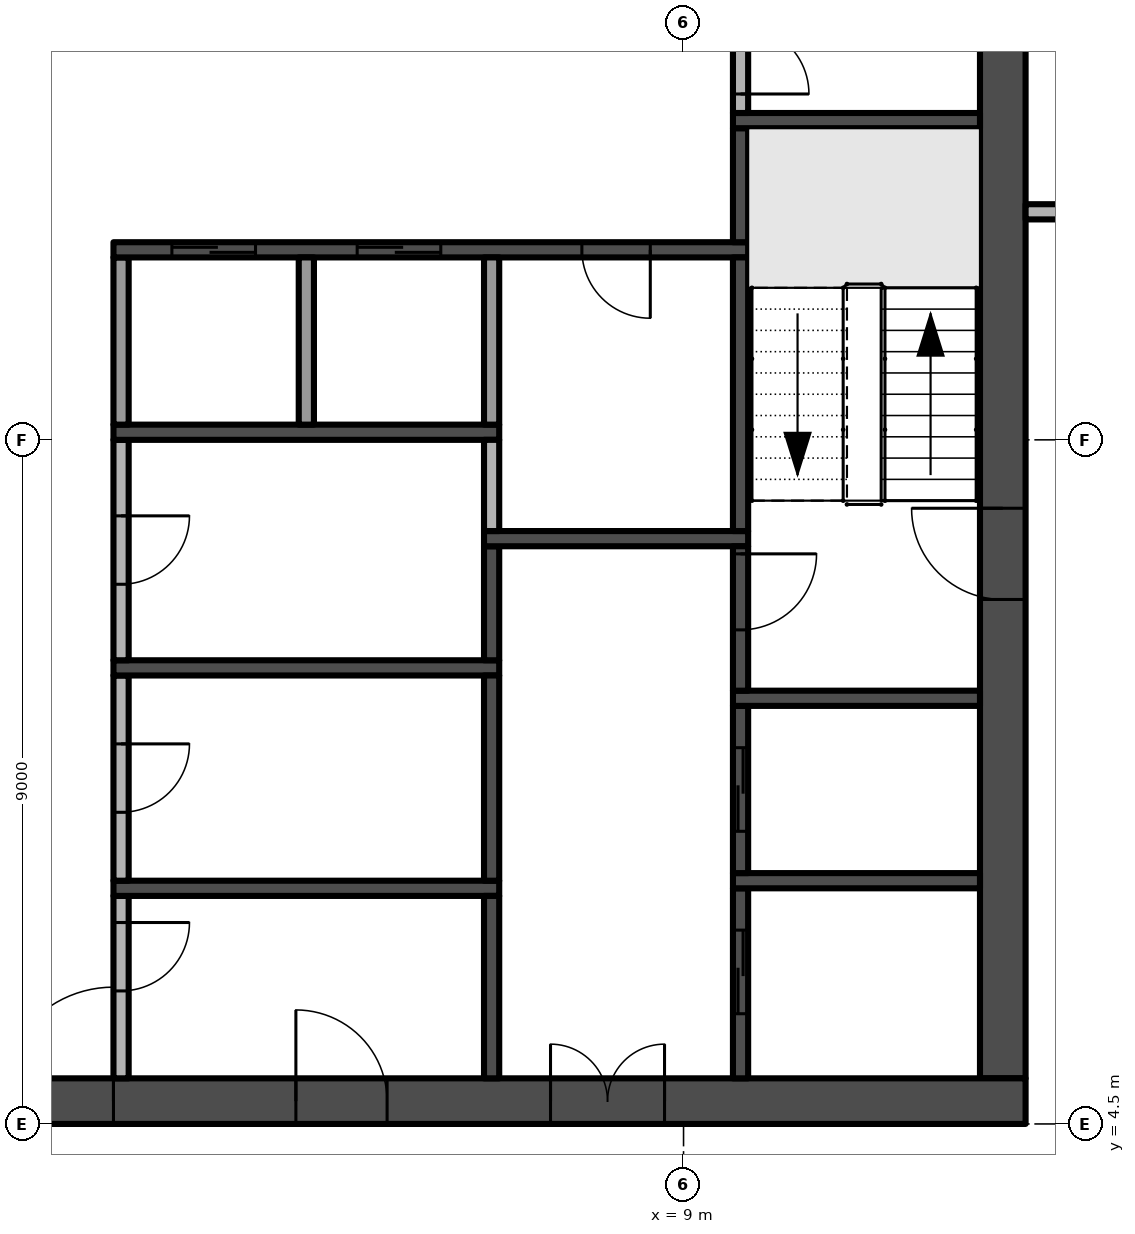
"""IFC4 building model, lengths in metres.
Left out: names, types, materials, properties, quantities, classifications, styles, units other than length and angle.
Written with IfcOpenShell. Run it as: python <this file> out.ifc"""

import sys

from ifc_helpers import new_model, si_unit, direction, frame, frame_2d, origin, place, context, subcontext, project, spatial, rectangle, extrude, element, fill, save


model = new_model("IFC4")
c1 = context("Model", 3, precision=1e-05, world=origin(), true_north=direction((0.0, 1.0)))
c2 = subcontext(c1, "Body", "Model", "MODEL_VIEW")
j1 = project(units=[si_unit("LENGTHUNIT", "METRE"), si_unit("PLANEANGLEUNIT", "RADIAN")], contexts=[c1])
p1 = place(None, origin())
s1 = spatial("IfcSite", under=j1, at=p1, CompositionType="ELEMENT")
p2 = place(p1, origin())
s2 = spatial("IfcBuilding", under=s1, at=p2, CompositionType="ELEMENT")
p3 = place(p2, frame((0.0, 0.0, 280.6)))
s3 = spatial("IfcBuildingStorey", under=s2, at=p3, CompositionType="ELEMENT", Elevation=280.6)
p4 = place(p3, frame((-13.5, 4.8, -0.3), z_axis=(0.0, 0.0, 1.0), x_axis=(1.0, 0.0, 0.0)))
e1 = element("IfcWall", 1, at=p4, inside=s3, PredefinedType="SHEAR", context=c2, shape_type="SweptSolid", body=[
    extrude(rectangle(XDim=27.0, YDim=0.6, at=frame_2d((13.5, 0.0))), origin(), (0.0, 0.0, 1.0), 3.8),
])
p5 = place(p4, frame((12.0, 0.0, 0.3)))
e2 = element("IfcOpeningElement", 2, at=p5, cuts=e1, PredefinedType="OPENING", context=c2, shape_type="SweptSolid", body=[
    extrude(rectangle(XDim=3.0, YDim=2.4, at=frame_2d((1.5, 1.2))), frame((0.0, 0.31, 0.0), z_axis=(0.0, -1.0, 0.0), x_axis=(1.0, 0.0, 0.0)), (0.0, 0.0, 1.0), 0.62),
])
p6 = place(p4, frame((4.9, 0.0, 0.3)))
e3 = element("IfcOpeningElement", 3, at=p6, cuts=e1, PredefinedType="OPENING", context=c2, shape_type="SweptSolid", body=[
    extrude(rectangle(XDim=1.2, YDim=2.2, at=frame_2d((0.6, 1.1))), frame((0.0, 0.31, 0.0), z_axis=(0.0, -1.0, 0.0), x_axis=(1.0, 0.0, 0.0)), (0.0, 0.0, 1.0), 0.62),
])
p7 = place(p4, frame((20.75, 0.0, 0.3)))
e4 = element("IfcOpeningElement", 4, at=p7, cuts=e1, PredefinedType="OPENING", context=c2, shape_type="SweptSolid", body=[
    extrude(rectangle(XDim=1.5, YDim=2.2, at=frame_2d((0.75, 1.1))), frame((0.0, 0.31, 0.0), z_axis=(0.0, -1.0, 0.0), x_axis=(1.0, 0.0, 0.0)), (0.0, 0.0, 1.0), 0.62),
])
p8 = place(p4, frame((17.4, 0.0, 0.3)))
e5 = element("IfcOpeningElement", 5, at=p8, cuts=e1, PredefinedType="OPENING", context=c2, shape_type="SweptSolid", body=[
    extrude(rectangle(XDim=1.2, YDim=2.2, at=frame_2d((0.6, 1.1))), frame((0.0, 0.31, 0.0), z_axis=(0.0, -1.0, 0.0), x_axis=(1.0, 0.0, 0.0)), (0.0, 0.0, 1.0), 0.62),
])
p9 = place(p3, frame((13.2, 5.1, -0.3), z_axis=(0.0, 0.0, 1.0), x_axis=(0.0, 1.0, 0.0)))
e6 = element("IfcWall", 6, at=p9, inside=s3, PredefinedType="SHEAR", context=c2, shape_type="SweptSolid", body=[
    extrude(rectangle(XDim=16.8, YDim=0.6, at=frame_2d((8.4, 0.0))), origin(), (0.0, 0.0, 1.0), 3.8),
])
p10 = place(p9, frame((6.3, 0.0, 0.3)))
e7 = element("IfcOpeningElement", 7, at=p10, cuts=e6, PredefinedType="OPENING", context=c2, shape_type="SweptSolid", body=[
    extrude(rectangle(XDim=1.2, YDim=2.2, at=frame_2d((0.6, 1.1))), frame((0.0, 0.31, 0.0), z_axis=(0.0, -1.0, 0.0), x_axis=(1.0, 0.0, 0.0)), (0.0, 0.0, 1.0), 0.62),
])
p11 = place(p3, frame((1.6, 7.5, 0.0), z_axis=(0.0, 0.0, 1.0), x_axis=(0.0, -1.0, 0.0)))
e8 = element("IfcWall", 8, at=p11, inside=s3, PredefinedType="PARTITIONING", context=c2, shape_type="SweptSolid", body=[
    extrude(rectangle(XDim=2.4, YDim=0.2, at=frame_2d((1.2, 0.0))), origin(), (0.0, 0.0, 1.0), 3.5),
])
p12 = place(p11, frame((0.35, 0.0, 0.0)))
e9 = element("IfcOpeningElement", 9, at=p12, cuts=e8, PredefinedType="OPENING", context=c2, shape_type="SweptSolid", body=[
    extrude(rectangle(XDim=0.9, YDim=2.1, at=frame_2d((0.45, 1.05))), frame((0.0, 0.11, 0.0), z_axis=(0.0, -1.0, 0.0), x_axis=(1.0, 0.0, 0.0)), (0.0, 0.0, 1.0), 0.22),
])
p13 = place(p3, frame((1.5, 7.6, 0.0), z_axis=(0.0, 0.0, 1.0), x_axis=(1.0, 0.0, 0.0)))
e10 = element("IfcWall", 10, at=p13, inside=s3, PredefinedType="SHEAR", context=c2, shape_type="SweptSolid", body=[
    extrude(rectangle(XDim=5.075, YDim=0.2, at=frame_2d((2.538, 0.0))), origin(), (0.0, 0.0, 1.0), 3.5),
])
p14 = place(p3, frame((1.6, 10.4, 0.0), z_axis=(0.0, 0.0, 1.0), x_axis=(0.0, -1.0, 0.0)))
e11 = element("IfcWall", 11, at=p14, inside=s3, PredefinedType="PARTITIONING", context=c2, shape_type="SweptSolid", body=[
    extrude(rectangle(XDim=2.7, YDim=0.2, at=frame_2d((1.35, 0.0))), origin(), (0.0, 0.0, 1.0), 3.5),
])
p15 = place(p14, frame((0.9, 0.0, 0.0)))
e12 = element("IfcOpeningElement", 12, at=p15, cuts=e11, PredefinedType="OPENING", context=c2, shape_type="SweptSolid", body=[
    extrude(rectangle(XDim=0.9, YDim=2.1, at=frame_2d((0.45, 1.05))), frame((0.0, 0.11, 0.0), z_axis=(0.0, -1.0, 0.0), x_axis=(1.0, 0.0, 0.0)), (0.0, 0.0, 1.0), 0.22),
])
p16 = place(p3, frame((1.5, 10.5, 0.0), z_axis=(0.0, 0.0, 1.0), x_axis=(1.0, 0.0, 0.0)))
e13 = element("IfcWall", 13, at=p16, inside=s3, PredefinedType="SHEAR", context=c2, shape_type="SweptSolid", body=[
    extrude(rectangle(XDim=5.075, YDim=0.2, at=frame_2d((2.538, 0.0))), origin(), (0.0, 0.0, 1.0), 3.5),
])
p17 = place(p3, frame((1.6, 13.5, 0.0), z_axis=(0.0, 0.0, 1.0), x_axis=(0.0, -1.0, 0.0)))
e14 = element("IfcWall", 14, at=p17, inside=s3, PredefinedType="PARTITIONING", context=c2, shape_type="SweptSolid", body=[
    extrude(rectangle(XDim=2.9, YDim=0.2, at=frame_2d((1.45, 0.0))), origin(), (0.0, 0.0, 1.0), 3.5),
])
p18 = place(p17, frame((1.0, 0.0, 0.0)))
e15 = element("IfcOpeningElement", 15, at=p18, cuts=e14, PredefinedType="OPENING", context=c2, shape_type="SweptSolid", body=[
    extrude(rectangle(XDim=0.9, YDim=2.1, at=frame_2d((0.45, 1.05))), frame((0.0, 0.11, 0.0), z_axis=(0.0, -1.0, 0.0), x_axis=(1.0, 0.0, 0.0)), (0.0, 0.0, 1.0), 0.22),
])
p19 = place(p3, frame((1.5, 13.6, 0.0), z_axis=(0.0, 0.0, 1.0), x_axis=(1.0, 0.0, 0.0)))
e16 = element("IfcWall", 16, at=p19, inside=s3, PredefinedType="SHEAR", context=c2, shape_type="SweptSolid", body=[
    extrude(rectangle(XDim=5.075, YDim=0.2, at=frame_2d((2.538, 0.0))), origin(), (0.0, 0.0, 1.0), 3.5),
])
p20 = place(p3, frame((1.6, 13.7, 0.0), z_axis=(0.0, 0.0, 1.0), x_axis=(0.0, 1.0, 0.0)))
e17 = element("IfcWall", 17, at=p20, inside=s3, PredefinedType="PARTITIONING", context=c2, shape_type="SweptSolid", body=[
    extrude(rectangle(XDim=2.2, YDim=0.2, at=frame_2d((1.1, 0.0))), origin(), (0.0, 0.0, 1.0), 3.5),
])
p21 = place(p3, frame((9.85, 16.0, 0.0), z_axis=(0.0, 0.0, 1.0), x_axis=(-1.0, 0.0, 0.0)))
e18 = element("IfcWall", 18, at=p21, inside=s3, PredefinedType="SHEAR", context=c2, shape_type="SweptSolid", body=[
    extrude(rectangle(XDim=8.35, YDim=0.2, at=frame_2d((4.175, 0.0))), origin(), (0.0, 0.0, 1.0), 3.5),
])
p22 = place(p21, frame((6.481, 0.0, 0.0)))
e19 = element("IfcOpeningElement", 19, at=p22, cuts=e18, PredefinedType="OPENING", context=c2, shape_type="SweptSolid", body=[
    extrude(rectangle(XDim=1.1, YDim=2.1, at=frame_2d((0.55, 1.05))), frame((0.0, 0.11, 0.0), z_axis=(0.0, -1.0, 0.0), x_axis=(1.0, 0.0, 0.0)), (0.0, 0.0, 1.0), 0.22),
])
p23 = place(p21, frame((4.044, 0.0, 0.0)))
e20 = element("IfcOpeningElement", 20, at=p23, cuts=e18, PredefinedType="OPENING", context=c2, shape_type="SweptSolid", body=[
    extrude(rectangle(XDim=1.1, YDim=2.1, at=frame_2d((0.55, 1.05))), frame((0.0, 0.11, 0.0), z_axis=(0.0, -1.0, 0.0), x_axis=(1.0, 0.0, 0.0)), (0.0, 0.0, 1.0), 0.22),
])
p24 = place(p21, frame((1.288, 0.0, 0.0)))
e21 = element("IfcOpeningElement", 21, at=p24, cuts=e18, PredefinedType="OPENING", context=c2, shape_type="SweptSolid", body=[
    extrude(rectangle(XDim=0.9, YDim=2.1, at=frame_2d((0.45, 1.05))), frame((0.0, 0.11, 0.0), z_axis=(0.0, -1.0, 0.0), x_axis=(1.0, 0.0, 0.0)), (0.0, 0.0, 1.0), 0.22),
])
p25 = place(p3, frame((4.037, 13.7, 0.0), z_axis=(0.0, 0.0, 1.0), x_axis=(0.0, 1.0, 0.0)))
e22 = element("IfcWall", 22, at=p25, inside=s3, PredefinedType="PARTITIONING", context=c2, shape_type="SweptSolid", body=[
    extrude(rectangle(XDim=2.2, YDim=0.2, at=frame_2d((1.1, 0.0))), origin(), (0.0, 0.0, 1.0), 3.5),
])
p26 = place(p3, frame((6.475, 5.1, 0.0), z_axis=(0.0, 0.0, 1.0), x_axis=(0.0, 1.0, 0.0)))
e23 = element("IfcWall", 23, at=p26, inside=s3, PredefinedType="SHEAR", context=c2, shape_type="SweptSolid", body=[
    extrude(rectangle(XDim=2.4, YDim=0.2, at=frame_2d((1.2, 0.0))), origin(), (0.0, 0.0, 1.0), 3.5),
])
p27 = place(p3, frame((6.475, 7.7, 0.0), z_axis=(0.0, 0.0, 1.0), x_axis=(0.0, 1.0, 0.0)))
e24 = element("IfcWall", 24, at=p27, inside=s3, PredefinedType="SHEAR", context=c2, shape_type="SweptSolid", body=[
    extrude(rectangle(XDim=2.7, YDim=0.2, at=frame_2d((1.35, 0.0))), origin(), (0.0, 0.0, 1.0), 3.5),
])
p28 = place(p3, frame((6.475, 10.6, 0.0), z_axis=(0.0, 0.0, 1.0), x_axis=(0.0, 1.0, 0.0)))
e25 = element("IfcWall", 25, at=p28, inside=s3, PredefinedType="SHEAR", context=c2, shape_type="SweptSolid", body=[
    extrude(rectangle(XDim=1.5, YDim=0.2, at=frame_2d((0.75, 0.0))), origin(), (0.0, 0.0, 1.0), 3.5),
])
p29 = place(p3, frame((6.375, 12.2, 0.0), z_axis=(0.0, 0.0, 1.0), x_axis=(1.0, 0.0, 0.0)))
e26 = element("IfcWall", 26, at=p29, inside=s3, PredefinedType="SHEAR", context=c2, shape_type="SweptSolid", body=[
    extrude(rectangle(XDim=3.475, YDim=0.2, at=frame_2d((1.738, 0.0))), origin(), (0.0, 0.0, 1.0), 3.5),
])
p30 = place(p3, frame((6.475, 12.3, 0.0), z_axis=(0.0, 0.0, 1.0), x_axis=(0.0, 1.0, 0.0)))
e27 = element("IfcWall", 27, at=p30, inside=s3, PredefinedType="PARTITIONING", context=c2, shape_type="SweptSolid", body=[
    extrude(rectangle(XDim=1.2, YDim=0.2, at=frame_2d((0.6, 0.0))), origin(), (0.0, 0.0, 1.0), 3.5),
])
p31 = place(p3, frame((6.475, 13.7, 0.0), z_axis=(0.0, 0.0, 1.0), x_axis=(0.0, 1.0, 0.0)))
e28 = element("IfcWall", 28, at=p31, inside=s3, PredefinedType="PARTITIONING", context=c2, shape_type="SweptSolid", body=[
    extrude(rectangle(XDim=2.2, YDim=0.2, at=frame_2d((1.1, 0.0))), origin(), (0.0, 0.0, 1.0), 3.5),
])
p32 = place(p3, frame((9.75, 5.1, 0.0), z_axis=(0.0, 0.0, 1.0), x_axis=(0.0, 1.0, 0.0)))
e29 = element("IfcWall", 29, at=p32, inside=s3, PredefinedType="SHEAR", context=c2, shape_type="SweptSolid", body=[
    extrude(rectangle(XDim=2.5, YDim=0.2, at=frame_2d((1.25, 0.0))), origin(), (0.0, 0.0, 1.0), 3.5),
])
p33 = place(p32, frame((0.85, 0.0, 0.0)))
e30 = element("IfcOpeningElement", 30, at=p33, cuts=e29, PredefinedType="OPENING", context=c2, shape_type="SweptSolid", body=[
    extrude(rectangle(XDim=1.1, YDim=2.1, at=frame_2d((0.55, 1.05))), frame((0.0, 0.11, 0.0), z_axis=(0.0, -1.0, 0.0), x_axis=(1.0, 0.0, 0.0)), (0.0, 0.0, 1.0), 0.22),
])
p34 = place(p3, frame((9.65, 7.7, 0.0), z_axis=(0.0, 0.0, 1.0), x_axis=(1.0, 0.0, 0.0)))
e31 = element("IfcWall", 31, at=p34, inside=s3, PredefinedType="SHEAR", context=c2, shape_type="SweptSolid", body=[
    extrude(rectangle(XDim=3.25, YDim=0.2, at=frame_2d((1.625, 0.0))), origin(), (0.0, 0.0, 1.0), 3.5),
])
p35 = place(p3, frame((9.75, 7.8, 0.0), z_axis=(0.0, 0.0, 1.0), x_axis=(0.0, 1.0, 0.0)))
e32 = element("IfcWall", 32, at=p35, inside=s3, PredefinedType="SHEAR", context=c2, shape_type="SweptSolid", body=[
    extrude(rectangle(XDim=2.2, YDim=0.2, at=frame_2d((1.1, 0.0))), origin(), (0.0, 0.0, 1.0), 3.5),
])
p36 = place(p35, frame((0.55, 0.0, 0.0)))
e33 = element("IfcOpeningElement", 33, at=p36, cuts=e32, PredefinedType="OPENING", context=c2, shape_type="SweptSolid", body=[
    extrude(rectangle(XDim=1.1, YDim=2.1, at=frame_2d((0.55, 1.05))), frame((0.0, 0.11, 0.0), z_axis=(0.0, -1.0, 0.0), x_axis=(1.0, 0.0, 0.0)), (0.0, 0.0, 1.0), 0.22),
])
p37 = place(p3, frame((9.65, 10.1, 0.0), z_axis=(0.0, 0.0, 1.0), x_axis=(1.0, 0.0, 0.0)))
e34 = element("IfcWall", 34, at=p37, inside=s3, PredefinedType="SHEAR", context=c2, shape_type="SweptSolid", body=[
    extrude(rectangle(XDim=3.25, YDim=0.2, at=frame_2d((1.625, 0.0))), origin(), (0.0, 0.0, 1.0), 3.5),
])
p38 = place(p3, frame((9.75, 12.1, 0.0), z_axis=(0.0, 0.0, 1.0), x_axis=(0.0, -1.0, 0.0)))
e35 = element("IfcWall", 35, at=p38, inside=s3, PredefinedType="SHEAR", context=c2, shape_type="SweptSolid", body=[
    extrude(rectangle(XDim=1.9, YDim=0.2, at=frame_2d((0.95, 0.0))), origin(), (0.0, 0.0, 1.0), 3.5),
])
p39 = place(p38, frame((0.1, 0.0, 0.0)))
e36 = element("IfcOpeningElement", 36, at=p39, cuts=e35, PredefinedType="OPENING", context=c2, shape_type="SweptSolid", body=[
    extrude(rectangle(XDim=1.0, YDim=2.2, at=frame_2d((0.5, 1.1))), frame((0.0, 0.11, 0.0), z_axis=(0.0, -1.0, 0.0), x_axis=(1.0, 0.0, 0.0)), (0.0, 0.0, 1.0), 0.22),
])
p40 = place(p3, frame((9.75, 12.3, 0.0), z_axis=(0.0, 0.0, 1.0), x_axis=(0.0, 1.0, 0.0)))
e37 = element("IfcWall", 37, at=p40, inside=s3, PredefinedType="SHEAR", context=c2, shape_type="SweptSolid", body=[
    extrude(rectangle(XDim=3.6, YDim=0.2, at=frame_2d((1.8, 0.0))), origin(), (0.0, 0.0, 1.0), 3.5),
])
p41 = place(p3, frame((9.75, 16.1, 0.0), z_axis=(0.0, 0.0, 1.0), x_axis=(0.0, 1.0, 0.0)))
e38 = element("IfcWall", 38, at=p41, inside=s3, PredefinedType="SHEAR", context=c2, shape_type="SweptSolid", body=[
    extrude(rectangle(XDim=1.5, YDim=0.2, at=frame_2d((0.75, 0.0))), origin(), (0.0, 0.0, 1.0), 3.5),
])
p42 = place(p3, frame((9.65, 17.7, 0.0), z_axis=(0.0, 0.0, 1.0), x_axis=(1.0, 0.0, 0.0)))
e39 = element("IfcWall", 39, at=p42, inside=s3, PredefinedType="SHEAR", context=c2, shape_type="SweptSolid", body=[
    extrude(rectangle(XDim=3.25, YDim=0.2, at=frame_2d((1.625, 0.0))), origin(), (0.0, 0.0, 1.0), 3.5),
])
p43 = place(p3, frame((9.75, 19.2, 0.0), z_axis=(0.0, 0.0, 1.0), x_axis=(0.0, -1.0, 0.0)))
e40 = element("IfcWall", 40, at=p43, inside=s3, PredefinedType="PARTITIONING", context=c2, shape_type="SweptSolid", body=[
    extrude(rectangle(XDim=1.4, YDim=0.2, at=frame_2d((0.7, 0.0))), origin(), (0.0, 0.0, 1.0), 3.5),
])
p44 = place(p43, frame((0.25, 0.0, 0.0)))
e41 = element("IfcOpeningElement", 41, at=p44, cuts=e40, PredefinedType="OPENING", context=c2, shape_type="SweptSolid", body=[
    extrude(rectangle(XDim=0.9, YDim=2.1, at=frame_2d((0.45, 1.05))), frame((0.0, 0.11, 0.0), z_axis=(0.0, -1.0, 0.0), x_axis=(1.0, 0.0, 0.0)), (0.0, 0.0, 1.0), 0.22),
])
p45 = place(p3, frame((13.5, 16.5, 0.0), z_axis=(0.0, 0.0, 1.0), x_axis=(1.0, 0.0, 0.0)))
e42 = element("IfcWall", 42, at=p45, inside=s3, PredefinedType="PARTITIONING", context=c2, shape_type="SweptSolid", body=[
    extrude(rectangle(XDim=3.825, YDim=0.2, at=frame_2d((1.913, 0.0))), origin(), (0.0, 0.0, 1.0), 3.5),
])
p46 = place(p45, frame((1.55, 0.0, 0.0)))
e43 = element("IfcOpeningElement", 43, at=p46, cuts=e42, PredefinedType="OPENING", context=c2, shape_type="SweptSolid", body=[
    extrude(rectangle(XDim=0.9, YDim=2.1, at=frame_2d((0.45, 1.05))), frame((0.0, 0.11, 0.0), z_axis=(0.0, -1.0, 0.0), x_axis=(1.0, 0.0, 0.0)), (0.0, 0.0, 1.0), 0.22),
])
p47 = place(p5, frame((3.0, 0.0, 0.0), z_axis=(0.0, 0.0, 1.0), x_axis=(-1.0, 0.0, 0.0)))
e44 = element("IfcDoor", 44, at=p47, inside=s3, OperationType="DOUBLE_DOOR_SINGLE_SWING", PredefinedType="DOOR", context=c2, shape_type="SweptSolid", body=[
    extrude(rectangle(XDim=3.0, YDim=2.4, at=frame_2d((1.5, 1.2))), frame((0.0, 0.025, 0.0), z_axis=(0.0, -1.0, 0.0), x_axis=(1.0, 0.0, 0.0)), (0.0, 0.0, 1.0), 0.05),
])
fill(e2, e44)
p48 = place(p10, frame((1.2, 0.0, 0.0), z_axis=(0.0, 0.0, 1.0), x_axis=(-1.0, 0.0, 0.0)))
e45 = element("IfcDoor", 45, at=p48, inside=s3, OperationType="SINGLE_SWING_LEFT", PredefinedType="DOOR", context=c2, shape_type="SweptSolid", body=[
    extrude(rectangle(XDim=1.2, YDim=2.2, at=frame_2d((0.6, 1.1))), frame((0.0, 0.025, 0.0), z_axis=(0.0, -1.0, 0.0), x_axis=(1.0, 0.0, 0.0)), (0.0, 0.0, 1.0), 0.05),
])
fill(e7, e45)
p49 = place(p7, frame((1.5, 0.0, 0.0), z_axis=(0.0, 0.0, 1.0), x_axis=(-1.0, 0.0, 0.0)))
e46 = element("IfcDoor", 46, at=p49, inside=s3, OperationType="DOUBLE_DOOR_SINGLE_SWING", PredefinedType="DOOR", context=c2, shape_type="SweptSolid", body=[
    extrude(rectangle(XDim=1.5, YDim=2.2, at=frame_2d((0.75, 1.1))), frame((0.0, 0.025, 0.0), z_axis=(0.0, -1.0, 0.0), x_axis=(1.0, 0.0, 0.0)), (0.0, 0.0, 1.0), 0.05),
])
fill(e4, e46)
p50 = place(p8, frame((1.2, 0.0, 0.0), z_axis=(0.0, 0.0, 1.0), x_axis=(-1.0, 0.0, 0.0)))
e47 = element("IfcDoor", 47, at=p50, inside=s3, OperationType="SINGLE_SWING_RIGHT", PredefinedType="DOOR", context=c2, shape_type="SweptSolid", body=[
    extrude(rectangle(XDim=1.2, YDim=2.2, at=frame_2d((0.6, 1.1))), frame((0.0, 0.025, 0.0), z_axis=(0.0, -1.0, 0.0), x_axis=(1.0, 0.0, 0.0)), (0.0, 0.0, 1.0), 0.05),
])
fill(e5, e47)
p51 = place(p39, origin())
e48 = element("IfcDoor", 48, at=p51, inside=s3, OperationType="SINGLE_SWING_LEFT", PredefinedType="DOOR", context=c2, shape_type="SweptSolid", body=[
    extrude(rectangle(XDim=1.0, YDim=2.2, at=frame_2d((0.5, 1.1))), frame((0.0, 0.025, 0.0), z_axis=(0.0, -1.0, 0.0), x_axis=(1.0, 0.0, 0.0)), (0.0, 0.0, 1.0), 0.05),
])
fill(e36, e48)
p52 = place(p22, origin())
e49 = element("IfcDoor", 49, at=p52, inside=s3, OperationType="SLIDING_TO_RIGHT", PredefinedType="DOOR", context=c2, shape_type="SweptSolid", body=[
    extrude(rectangle(XDim=1.1, YDim=2.1, at=frame_2d((0.55, 1.05))), frame((0.0, 0.025, 0.0), z_axis=(0.0, -1.0, 0.0), x_axis=(1.0, 0.0, 0.0)), (0.0, 0.0, 1.0), 0.05),
])
fill(e19, e49)
p53 = place(p23, origin())
e50 = element("IfcDoor", 50, at=p53, inside=s3, OperationType="SLIDING_TO_RIGHT", PredefinedType="DOOR", context=c2, shape_type="SweptSolid", body=[
    extrude(rectangle(XDim=1.1, YDim=2.1, at=frame_2d((0.55, 1.05))), frame((0.0, 0.025, 0.0), z_axis=(0.0, -1.0, 0.0), x_axis=(1.0, 0.0, 0.0)), (0.0, 0.0, 1.0), 0.05),
])
fill(e20, e50)
p54 = place(p33, origin())
e51 = element("IfcDoor", 51, at=p54, inside=s3, OperationType="SLIDING_TO_RIGHT", PredefinedType="DOOR", context=c2, shape_type="SweptSolid", body=[
    extrude(rectangle(XDim=1.1, YDim=2.1, at=frame_2d((0.55, 1.05))), frame((0.0, 0.025, 0.0), z_axis=(0.0, -1.0, 0.0), x_axis=(1.0, 0.0, 0.0)), (0.0, 0.0, 1.0), 0.05),
])
fill(e30, e51)
p55 = place(p36, origin())
e52 = element("IfcDoor", 52, at=p55, inside=s3, OperationType="SLIDING_TO_RIGHT", PredefinedType="DOOR", context=c2, shape_type="SweptSolid", body=[
    extrude(rectangle(XDim=1.1, YDim=2.1, at=frame_2d((0.55, 1.05))), frame((0.0, 0.025, 0.0), z_axis=(0.0, -1.0, 0.0), x_axis=(1.0, 0.0, 0.0)), (0.0, 0.0, 1.0), 0.05),
])
fill(e33, e52)
p56 = place(p12, origin())
e53 = element("IfcDoor", 53, at=p56, inside=s3, OperationType="SINGLE_SWING_LEFT", PredefinedType="DOOR", context=c2, shape_type="SweptSolid", body=[
    extrude(rectangle(XDim=0.9, YDim=2.1, at=frame_2d((0.45, 1.05))), frame((0.0, 0.025, 0.0), z_axis=(0.0, -1.0, 0.0), x_axis=(1.0, 0.0, 0.0)), (0.0, 0.0, 1.0), 0.05),
])
fill(e9, e53)
p57 = place(p15, origin())
e54 = element("IfcDoor", 54, at=p57, inside=s3, OperationType="SINGLE_SWING_LEFT", PredefinedType="DOOR", context=c2, shape_type="SweptSolid", body=[
    extrude(rectangle(XDim=0.9, YDim=2.1, at=frame_2d((0.45, 1.05))), frame((0.0, 0.025, 0.0), z_axis=(0.0, -1.0, 0.0), x_axis=(1.0, 0.0, 0.0)), (0.0, 0.0, 1.0), 0.05),
])
fill(e12, e54)
p58 = place(p18, origin())
e55 = element("IfcDoor", 55, at=p58, inside=s3, OperationType="SINGLE_SWING_LEFT", PredefinedType="DOOR", context=c2, shape_type="SweptSolid", body=[
    extrude(rectangle(XDim=0.9, YDim=2.1, at=frame_2d((0.45, 1.05))), frame((0.0, 0.025, 0.0), z_axis=(0.0, -1.0, 0.0), x_axis=(1.0, 0.0, 0.0)), (0.0, 0.0, 1.0), 0.05),
])
fill(e15, e55)
p59 = place(p24, origin())
e56 = element("IfcDoor", 56, at=p59, inside=s3, OperationType="SINGLE_SWING_LEFT", PredefinedType="DOOR", context=c2, shape_type="SweptSolid", body=[
    extrude(rectangle(XDim=0.9, YDim=2.1, at=frame_2d((0.45, 1.05))), frame((0.0, 0.025, 0.0), z_axis=(0.0, -1.0, 0.0), x_axis=(1.0, 0.0, 0.0)), (0.0, 0.0, 1.0), 0.05),
])
fill(e21, e56)
p60 = place(p44, origin())
e57 = element("IfcDoor", 57, at=p60, inside=s3, OperationType="SINGLE_SWING_RIGHT", PredefinedType="DOOR", context=c2, shape_type="SweptSolid", body=[
    extrude(rectangle(XDim=0.9, YDim=2.1, at=frame_2d((0.45, 1.05))), frame((0.0, 0.025, 0.0), z_axis=(0.0, -1.0, 0.0), x_axis=(1.0, 0.0, 0.0)), (0.0, 0.0, 1.0), 0.05),
])
fill(e41, e57)
save(model, sys.argv[1])
